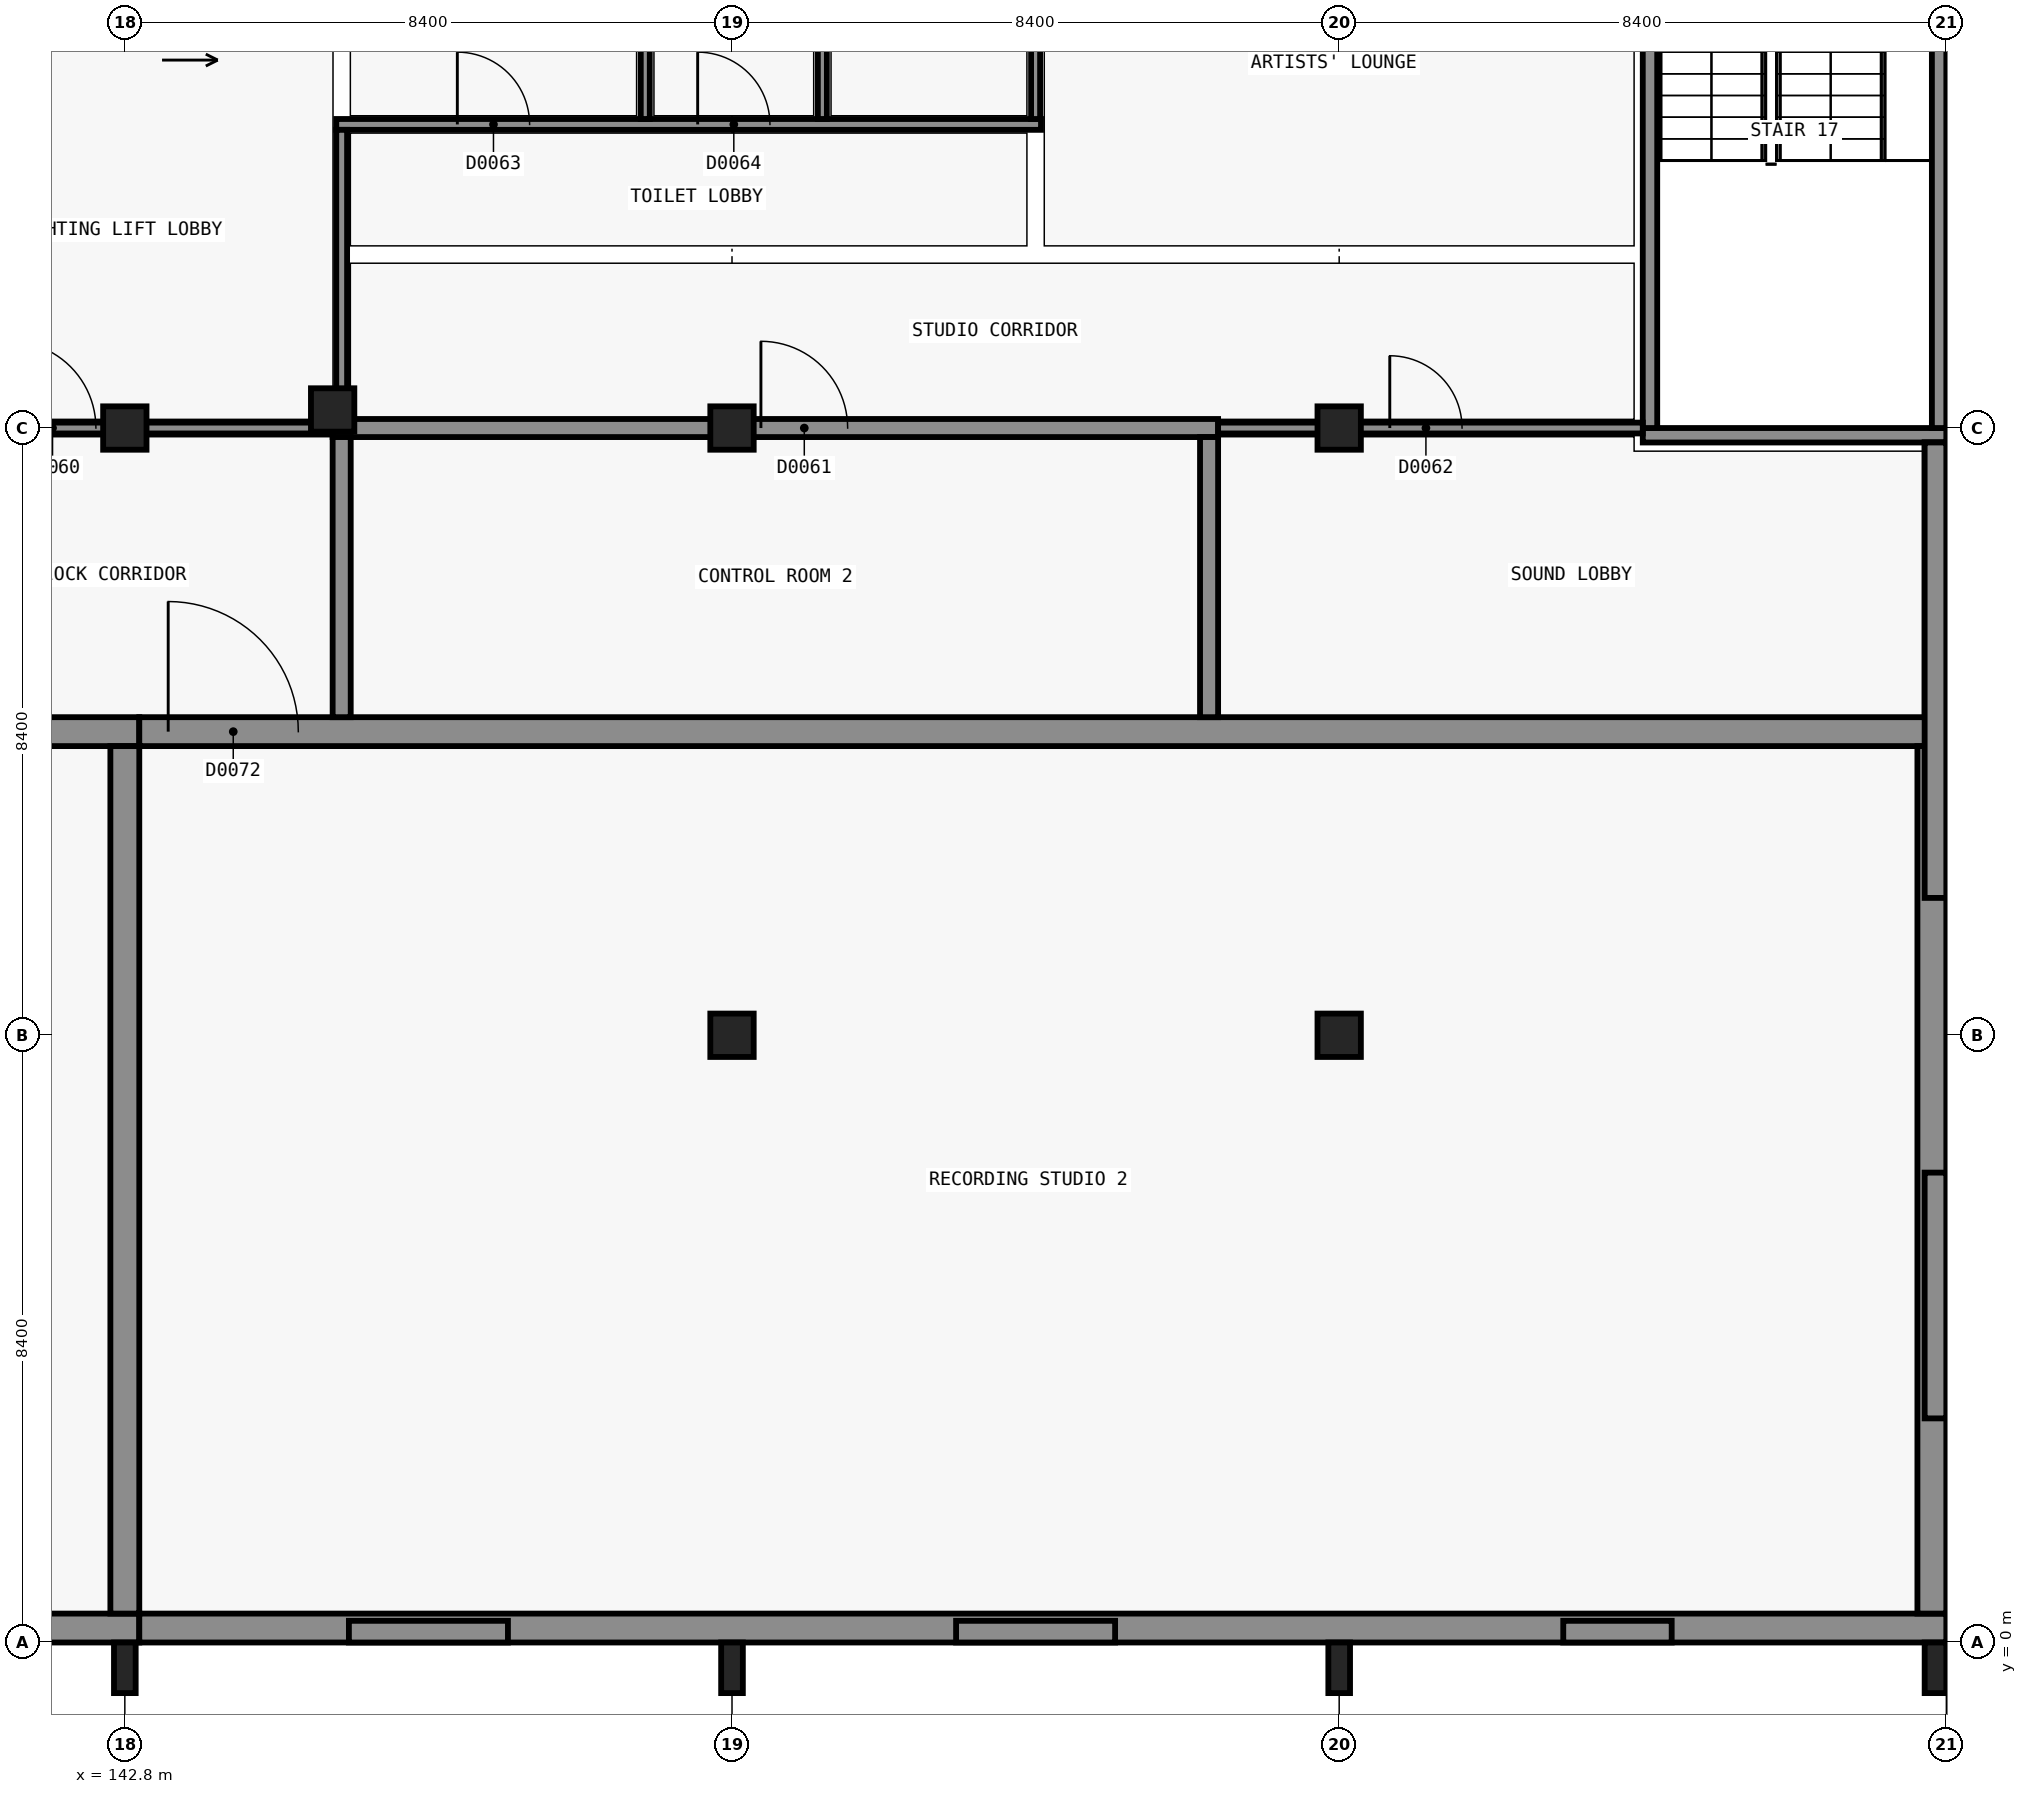
"""IFC4 building model, lengths in metres.
Left out: names, types, materials, properties, quantities, classifications, styles, units other than length and angle.
Written with IfcOpenShell. Run it as: python <this file> out.ifc"""

import sys

from ifc_helpers import new_model, si_unit, direction, frame, frame_2d, origin, origin_2d, place, context, subcontext, project, spatial, rectangle, extrude, element, fill, save


model = new_model("IFC4")
c1 = context("Model", 3, precision=1e-05, world=origin(), true_north=direction((0.0, 1.0)))
c2 = subcontext(c1, "Body", "Model", "MODEL_VIEW")
j1 = project(units=[si_unit("LENGTHUNIT", "METRE"), si_unit("PLANEANGLEUNIT", "RADIAN")], contexts=[c1])
p1 = place(None, origin())
s1 = spatial("IfcSite", under=j1, at=p1, CompositionType="ELEMENT")
p2 = place(p1, origin())
s2 = spatial("IfcBuilding", under=s1, at=p2, CompositionType="ELEMENT")
p3 = place(p2, origin())
s3 = spatial("IfcBuildingStorey", under=s2, at=p3, CompositionType="ELEMENT", Elevation=0.0)
p4 = place(p3, frame((168.0, 16.7, -0.3), z_axis=(0.0, 0.0, 1.0), x_axis=(-1.0, 0.0, 0.0)))
e1 = element("IfcWall", 1, at=p4, inside=s3, PredefinedType="SHEAR", context=c2, shape_type="SweptSolid", body=[
    extrude(rectangle(XDim=4.199, YDim=0.2, at=frame_2d((2.1, 0.0))), origin(), (0.0, 0.0, 1.0), 5.7),
])
p5 = place(p3, frame((163.9, 16.8, -0.3), z_axis=(0.0, 0.0, 1.0), x_axis=(0.0, 1.0, 0.0)))
e2 = element("IfcWall", 2, at=p5, inside=s3, PredefinedType="SHEAR", context=c2, shape_type="SweptSolid", body=[
    extrude(rectangle(XDim=8.2, YDim=0.2, at=frame_2d((4.1, 0.0))), origin(), (0.0, 0.0, 1.0), 5.7),
])
p6 = place(p5, frame((6.55, 0.0, 0.3)))
e3 = element("IfcOpeningElement", 3, at=p6, cuts=e2, PredefinedType="OPENING", context=c2, shape_type="SweptSolid", body=[
    extrude(rectangle(XDim=1.2, YDim=2.1, at=frame_2d((0.6, 1.05))), frame((0.0, 0.11, 0.0), z_axis=(0.0, -1.0, 0.0), x_axis=(1.0, 0.0, 0.0)), (0.0, 0.0, 1.0), 0.22),
])
p7 = place(p3, frame((167.9, 25.0, -0.3), z_axis=(0.0, 0.0, 1.0), x_axis=(0.0, -1.0, 0.0)))
e4 = element("IfcWall", 4, at=p7, inside=s3, PredefinedType="SHEAR", context=c2, shape_type="SweptSolid", body=[
    extrude(rectangle(XDim=8.2, YDim=0.2, at=frame_2d((4.1, 0.0))), origin(), (0.0, 0.0, 1.0), 5.7),
])
p8 = place(p3, frame((143.0, 0.2, -0.3), z_axis=(0.0, 0.0, 1.0), x_axis=(-1.0, 0.0, 0.0)))
e5 = element("IfcWall", 5, at=p8, inside=s3, PredefinedType="SHEAR", context=c2, shape_type="SweptSolid", body=[
    extrude(rectangle(XDim=17.0, YDim=0.4, at=frame_2d((8.5, 0.0))), origin(), (0.0, 0.0, 1.0), 5.7),
])
p9 = place(p3, frame((126.0, 12.6, -0.3), z_axis=(0.0, 0.0, 1.0), x_axis=(1.0, 0.0, 0.0)))
e6 = element("IfcWall", 6, at=p9, inside=s3, PredefinedType="SHEAR", context=c2, shape_type="SweptSolid", body=[
    extrude(rectangle(XDim=17.0, YDim=0.4, at=frame_2d((8.5, 0.0))), origin(), (0.0, 0.0, 1.0), 5.7),
])
p10 = place(p9, frame((14.1, 0.0, 0.3)))
e7 = element("IfcOpeningElement", 7, at=p10, cuts=e6, PredefinedType="OPENING", context=c2, shape_type="SweptSolid", body=[
    extrude(rectangle(XDim=1.2, YDim=2.1, at=frame_2d((0.6, 1.05))), frame((0.0, 0.21, 0.0), z_axis=(0.0, -1.0, 0.0), x_axis=(1.0, 0.0, 0.0)), (0.0, 0.0, 1.0), 0.42),
])
p11 = place(p3, frame((142.8, 12.4, -0.3), z_axis=(0.0, 0.0, 1.0), x_axis=(0.0, -1.0, 0.0)))
e8 = element("IfcWall", 8, at=p11, inside=s3, PredefinedType="SHEAR", context=c2, shape_type="SweptSolid", body=[
    extrude(rectangle(XDim=12.0, YDim=0.4, at=frame_2d((6.0, 0.0))), origin(), (0.0, 0.0, 1.0), 5.7),
])
p12 = place(p3, frame((168.0, 0.2, -0.3), z_axis=(0.0, 0.0, 1.0), x_axis=(-1.0, 0.0, 0.0)))
e9 = element("IfcWall", 9, at=p12, inside=s3, PredefinedType="SHEAR", context=c2, shape_type="SweptSolid", body=[
    extrude(rectangle(XDim=25.0, YDim=0.4, at=frame_2d((12.5, 0.0))), origin(), (0.0, 0.0, 1.0), 5.7),
])
p13 = place(p3, frame((143.0, 12.6, -0.3), z_axis=(0.0, 0.0, 1.0), x_axis=(1.0, 0.0, 0.0)))
e10 = element("IfcWall", 10, at=p13, inside=s3, PredefinedType="SHEAR", context=c2, shape_type="SweptSolid", body=[
    extrude(rectangle(XDim=25.0, YDim=0.4, at=frame_2d((12.5, 0.0))), origin(), (0.0, 0.0, 1.0), 5.7),
])
p14 = place(p13, frame((0.4, 0.0, 0.3)))
e11 = element("IfcOpeningElement", 11, at=p14, cuts=e10, PredefinedType="OPENING", context=c2, shape_type="SweptSolid", body=[
    extrude(rectangle(XDim=1.8, YDim=2.3, at=frame_2d((0.9, 1.15))), frame((0.0, 0.21, 0.0), z_axis=(0.0, -1.0, 0.0), x_axis=(1.0, 0.0, 0.0)), (0.0, 0.0, 1.0), 0.42),
])
p15 = place(p3, frame((167.8, 12.4, -0.3), z_axis=(0.0, 0.0, 1.0), x_axis=(0.0, -1.0, 0.0)))
e12 = element("IfcWall", 12, at=p15, inside=s3, PredefinedType="SHEAR", context=c2, shape_type="SweptSolid", body=[
    extrude(rectangle(XDim=12.0, YDim=0.4, at=frame_2d((6.0, 0.0))), origin(), (0.0, 0.0, 1.0), 5.7),
])
p16 = place(p3, frame((167.85, 16.6, -0.3), z_axis=(0.0, 0.0, 1.0), x_axis=(0.0, -1.0, 0.0)))
e13 = element("IfcWall", 13, at=p16, inside=s3, PredefinedType="SOLIDWALL", context=c2, shape_type="SweptSolid", body=[
    extrude(rectangle(XDim=3.8, YDim=0.3, at=frame_2d((1.9, 0.0))), origin(), (0.0, 0.0, 1.0), 5.7),
])
for number, where, z_axis, x_axis in (
    (14, (142.8, 16.8, -0.3), (0.0, 0.0, 1.0), (1.0, 0.0, 0.0)),
    (15, (151.2, 8.4, -0.3), (0.0, 0.0, 1.0), (1.0, 0.0, 0.0)),
    (16, (151.2, 16.8, -0.3), (0.0, 0.0, 1.0), (1.0, 0.0, 0.0)),
    (17, (159.6, 8.4, -0.3), (0.0, 0.0, 1.0), (1.0, 0.0, 0.0)),
    (18, (159.6, 16.8, -0.3), (0.0, 0.0, 1.0), (1.0, 0.0, 0.0)),
    (19, (145.675, 17.05, -0.3), (0.0, 0.0, 1.0), (1.0, 0.0, 0.0)),
):
    element("IfcColumn", number, at=place(p3, frame(where, z_axis=z_axis, x_axis=x_axis)), inside=s3, PredefinedType="COLUMN", context=c2, shape_type="SweptSolid", body=[
        extrude(rectangle(XDim=0.6, YDim=0.6, at=origin_2d()), origin(), (0.0, 0.0, 1.0), 5.7),
    ])
p17 = place(p3, frame((148.1, 0.15, -1.2), z_axis=(0.0, 0.0, 1.0), x_axis=(-1.0, 0.0, 0.0)))
e20 = element("IfcWall", 20, at=p17, inside=s3, PredefinedType="SOLIDWALL", context=c2, shape_type="SweptSolid", body=[
    extrude(rectangle(XDim=2.2, YDim=0.3, at=frame_2d((1.1, 0.0))), origin(), (0.0, 0.0, 1.0), 0.9),
])
p18 = place(p3, frame((156.5, 0.15, -1.2), z_axis=(0.0, 0.0, 1.0), x_axis=(-1.0, 0.0, 0.0)))
e21 = element("IfcWall", 21, at=p18, inside=s3, PredefinedType="SOLIDWALL", context=c2, shape_type="SweptSolid", body=[
    extrude(rectangle(XDim=2.2, YDim=0.3, at=frame_2d((1.1, 0.0))), origin(), (0.0, 0.0, 1.0), 0.9),
])
p19 = place(p3, frame((164.2, 0.15, -1.2), z_axis=(0.0, 0.0, 1.0), x_axis=(-1.0, 0.0, 0.0)))
e22 = element("IfcWall", 22, at=p19, inside=s3, PredefinedType="SOLIDWALL", context=c2, shape_type="SweptSolid", body=[
    extrude(rectangle(XDim=1.5, YDim=0.3, at=frame_2d((0.75, 0.0))), origin(), (0.0, 0.0, 1.0), 0.9),
])
p20 = place(p3, frame((167.85, 6.5, -1.2), z_axis=(0.0, 0.0, 1.0), x_axis=(0.0, -1.0, 0.0)))
e23 = element("IfcWall", 23, at=p20, inside=s3, PredefinedType="SOLIDWALL", context=c2, shape_type="SweptSolid", body=[
    extrude(rectangle(XDim=3.4, YDim=0.3, at=frame_2d((1.7, 0.0))), origin(), (0.0, 0.0, 1.0), 0.9),
])
p21 = place(p3, frame((167.85, 16.6, -1.2), z_axis=(0.0, 0.0, 1.0), x_axis=(0.0, -1.0, 0.0)))
e24 = element("IfcWall", 24, at=p21, inside=s3, PredefinedType="SOLIDWALL", context=c2, shape_type="SweptSolid", body=[
    extrude(rectangle(XDim=6.3, YDim=0.3, at=frame_2d((3.15, 0.0))), origin(), (0.0, 0.0, 1.0), 0.9),
])
for number, where, z_axis, x_axis in (
    (25, (142.8, -0.35, -0.3), (0.0, 0.0, 1.0), (1.0, 0.0, 0.0)),
    (26, (151.2, -0.35, -0.3), (0.0, 0.0, 1.0), (1.0, 0.0, 0.0)),
    (27, (159.6, -0.35, -0.3), (0.0, 0.0, 1.0), (1.0, 0.0, 0.0)),
    (28, (167.85, -0.35, -0.3), (0.0, 0.0, 1.0), (1.0, 0.0, 0.0)),
):
    element("IfcColumn", number, at=place(p3, frame(where, z_axis=z_axis, x_axis=x_axis)), inside=s3, PredefinedType="PILASTER", context=c2, shape_type="SweptSolid", body=[
        extrude(rectangle(XDim=0.3, YDim=0.7, at=origin_2d()), origin(), (0.0, 0.0, 1.0), 5.7),
    ])
p22 = place(p3, frame((145.675, 16.8, 0.0), z_axis=(0.0, 0.0, 1.0), x_axis=(1.0, 0.0, 0.0)))
e29 = element("IfcWall", 29, at=p22, inside=s3, PredefinedType="PARTITIONING", context=c2, shape_type="SweptSolid", body=[
    extrude(rectangle(XDim=12.25, YDim=0.25, at=frame_2d((6.125, 0.0))), origin(), (0.0, 0.0, 1.0), 4.4),
])
p23 = place(p22, frame((5.925, 0.0, 0.0)))
e30 = element("IfcOpeningElement", 30, at=p23, cuts=e29, PredefinedType="OPENING", context=c2, shape_type="SweptSolid", body=[
    extrude(rectangle(XDim=1.2, YDim=2.1, at=frame_2d((0.6, 1.05))), frame((0.0, 0.135, 0.0), z_axis=(0.0, -1.0, 0.0), x_axis=(1.0, 0.0, 0.0)), (0.0, 0.0, 1.0), 0.27),
])
for number, where, z_axis, x_axis in (
    (31, (145.8, 12.8, 0.0), (0.0, 0.0, 1.0), (0.0, 1.0, 0.0)),
    (32, (157.8, 12.8, 0.0), (0.0, 0.0, 1.0), (0.0, 1.0, 0.0)),
):
    element("IfcWall", number, at=place(p3, frame(where, z_axis=z_axis, x_axis=x_axis)), inside=s3, PredefinedType="PARTITIONING", context=c2, shape_type="SweptSolid", body=[
        extrude(rectangle(XDim=3.875, YDim=0.25, at=frame_2d((1.938, 0.0))), origin(), (0.0, 0.0, 1.0), 4.4),
    ])
p24 = place(p3, frame((157.925, 16.8, 0.0), z_axis=(0.0, 0.0, 1.0), x_axis=(1.0, 0.0, 0.0)))
e33 = element("IfcWall", 33, at=p24, inside=s3, PredefinedType="PARTITIONING", context=c2, shape_type="SweptSolid", body=[
    extrude(rectangle(XDim=5.875, YDim=0.15, at=frame_2d((2.938, 0.0))), origin(), (0.0, 0.0, 1.0), 4.4),
])
p25 = place(p24, frame((2.375, 0.0, 0.0)))
e34 = element("IfcOpeningElement", 34, at=p25, cuts=e33, PredefinedType="OPENING", context=c2, shape_type="SweptSolid", body=[
    extrude(rectangle(XDim=1.0, YDim=2.1, at=frame_2d((0.5, 1.05))), frame((0.0, 0.085, 0.0), z_axis=(0.0, -1.0, 0.0), x_axis=(1.0, 0.0, 0.0)), (0.0, 0.0, 1.0), 0.17),
])
p26 = place(p3, frame((145.725, 21.0, 0.0), z_axis=(0.0, 0.0, 1.0), x_axis=(1.0, 0.0, 0.0)))
e35 = element("IfcWall", 35, at=p26, inside=s3, PredefinedType="PARTITIONING", context=c2, shape_type="SweptSolid", body=[
    extrude(rectangle(XDim=9.75, YDim=0.15, at=frame_2d((4.875, 0.0))), origin(), (0.0, 0.0, 1.0), 4.4),
])
p27 = place(p26, frame((1.675, 0.0, 0.0)))
e36 = element("IfcOpeningElement", 36, at=p27, cuts=e35, PredefinedType="OPENING", context=c2, shape_type="SweptSolid", body=[
    extrude(rectangle(XDim=1.0, YDim=2.1, at=frame_2d((0.5, 1.05))), frame((0.0, 0.085, 0.0), z_axis=(0.0, -1.0, 0.0), x_axis=(1.0, 0.0, 0.0)), (0.0, 0.0, 1.0), 0.17),
])
p28 = place(p26, frame((5.0, 0.0, 0.0)))
e37 = element("IfcOpeningElement", 37, at=p28, cuts=e35, PredefinedType="OPENING", context=c2, shape_type="SweptSolid", body=[
    extrude(rectangle(XDim=1.0, YDim=2.1, at=frame_2d((0.5, 1.05))), frame((0.0, 0.085, 0.0), z_axis=(0.0, -1.0, 0.0), x_axis=(1.0, 0.0, 0.0)), (0.0, 0.0, 1.0), 0.17),
])
p29 = place(p3, frame((138.725, 16.8, 0.0), z_axis=(0.0, 0.0, 1.0), x_axis=(1.0, 0.0, 0.0)))
e38 = element("IfcWall", 38, at=p29, inside=s3, PredefinedType="SOLIDWALL", context=c2, shape_type="SweptSolid", body=[
    extrude(rectangle(XDim=6.95, YDim=0.15, at=frame_2d((3.475, 0.0))), origin(), (0.0, 0.0, 1.0), 4.4),
])
p30 = place(p29, frame((2.475, 0.0, 0.0)))
e39 = element("IfcOpeningElement", 39, at=p30, cuts=e38, PredefinedType="OPENING", context=c2, shape_type="SweptSolid", body=[
    extrude(rectangle(XDim=1.2, YDim=2.1, at=frame_2d((0.6, 1.05))), frame((0.0, 0.085, 0.0), z_axis=(0.0, -1.0, 0.0), x_axis=(1.0, 0.0, 0.0)), (0.0, 0.0, 1.0), 0.17),
])
p31 = place(p3, frame((145.8, 16.925, 0.0), z_axis=(0.0, 0.0, 1.0), x_axis=(0.0, 1.0, 0.0)))
e40 = element("IfcWall", 40, at=p31, inside=s3, PredefinedType="SOLIDWALL", context=c2, shape_type="SweptSolid", body=[
    extrude(rectangle(XDim=4.0, YDim=0.15, at=frame_2d((2.0, 0.0))), origin(), (0.0, 0.0, 1.0), 4.4),
])
for number, where, z_axis, x_axis in (
    (41, (150.0, 21.075, 0.0), (0.0, 0.0, 1.0), (0.0, 1.0, 0.0)),
    (42, (152.45, 21.075, 0.0), (0.0, 0.0, 1.0), (0.0, 1.0, 0.0)),
):
    element("IfcWall", number, at=place(p3, frame(where, z_axis=z_axis, x_axis=x_axis)), inside=s3, PredefinedType="PARTITIONING", context=c2, shape_type="SweptSolid", body=[
        extrude(rectangle(XDim=3.575, YDim=0.125, at=frame_2d((1.788, 0.0))), origin(), (0.0, 0.0, 1.0), 5.1),
    ])
p32 = place(p3, frame((155.4, 21.075, 0.0), z_axis=(0.0, 0.0, 1.0), x_axis=(0.0, 1.0, 0.0)))
e43 = element("IfcWall", 43, at=p32, inside=s3, PredefinedType="PARTITIONING", context=c2, shape_type="SweptSolid", body=[
    extrude(rectangle(XDim=3.575, YDim=0.125, at=frame_2d((1.788, 0.0))), origin(), (0.0, 0.0, 1.0), 5.1),
])
p33 = place(p32, frame((1.525, 0.0, 0.0)))
e44 = element("IfcOpeningElement", 44, at=p33, cuts=e43, PredefinedType="OPENING", context=c2, shape_type="SweptSolid", body=[
    extrude(rectangle(XDim=1.0, YDim=2.1, at=frame_2d((0.5, 1.05))), frame((0.0, 0.073, 0.0), z_axis=(0.0, -1.0, 0.0), x_axis=(1.0, 0.0, 0.0)), (0.0, 0.0, 1.0), 0.145),
])
p34 = place(p30, origin())
e45 = element("IfcDoor", 45, at=p34, inside=s3, OperationType="SINGLE_SWING_LEFT", PredefinedType="DOOR", context=c2, shape_type="SweptSolid", body=[
    extrude(rectangle(XDim=1.2, YDim=2.1, at=frame_2d((0.6, 1.05))), frame((0.0, 0.025, 0.0), z_axis=(0.0, -1.0, 0.0), x_axis=(1.0, 0.0, 0.0)), (0.0, 0.0, 1.0), 0.05),
])
fill(e39, e45)
p35 = place(p23, origin())
e46 = element("IfcDoor", 46, at=p35, inside=s3, OperationType="SINGLE_SWING_RIGHT", PredefinedType="DOOR", context=c2, shape_type="SweptSolid", body=[
    extrude(rectangle(XDim=1.2, YDim=2.1, at=frame_2d((0.6, 1.05))), frame((0.0, 0.025, 0.0), z_axis=(0.0, -1.0, 0.0), x_axis=(1.0, 0.0, 0.0)), (0.0, 0.0, 1.0), 0.05),
])
fill(e30, e46)
p36 = place(p25, origin())
e47 = element("IfcDoor", 47, at=p36, inside=s3, OperationType="SINGLE_SWING_RIGHT", PredefinedType="DOOR", context=c2, shape_type="SweptSolid", body=[
    extrude(rectangle(XDim=1.0, YDim=2.1, at=frame_2d((0.5, 1.05))), frame((0.0, 0.025, 0.0), z_axis=(0.0, -1.0, 0.0), x_axis=(1.0, 0.0, 0.0)), (0.0, 0.0, 1.0), 0.05),
])
fill(e34, e47)
p37 = place(p27, origin())
e48 = element("IfcDoor", 48, at=p37, inside=s3, OperationType="SINGLE_SWING_RIGHT", PredefinedType="DOOR", context=c2, shape_type="SweptSolid", body=[
    extrude(rectangle(XDim=1.0, YDim=2.1, at=frame_2d((0.5, 1.05))), frame((0.0, 0.025, 0.0), z_axis=(0.0, -1.0, 0.0), x_axis=(1.0, 0.0, 0.0)), (0.0, 0.0, 1.0), 0.05),
])
fill(e36, e48)
p38 = place(p28, origin())
e49 = element("IfcDoor", 49, at=p38, inside=s3, OperationType="SINGLE_SWING_RIGHT", PredefinedType="DOOR", context=c2, shape_type="SweptSolid", body=[
    extrude(rectangle(XDim=1.0, YDim=2.1, at=frame_2d((0.5, 1.05))), frame((0.0, 0.025, 0.0), z_axis=(0.0, -1.0, 0.0), x_axis=(1.0, 0.0, 0.0)), (0.0, 0.0, 1.0), 0.05),
])
fill(e37, e49)
p39 = place(p14, origin())
e50 = element("IfcDoor", 50, at=p39, inside=s3, OperationType="DOUBLE_DOOR_SINGLE_SWING", PredefinedType="DOOR", context=c2, shape_type="SweptSolid", body=[
    extrude(rectangle(XDim=1.8, YDim=2.3, at=frame_2d((0.9, 1.15))), frame((0.0, 0.025, 0.0), z_axis=(0.0, -1.0, 0.0), x_axis=(1.0, 0.0, 0.0)), (0.0, 0.0, 1.0), 0.05),
])
fill(e11, e50)
save(model, sys.argv[1])
